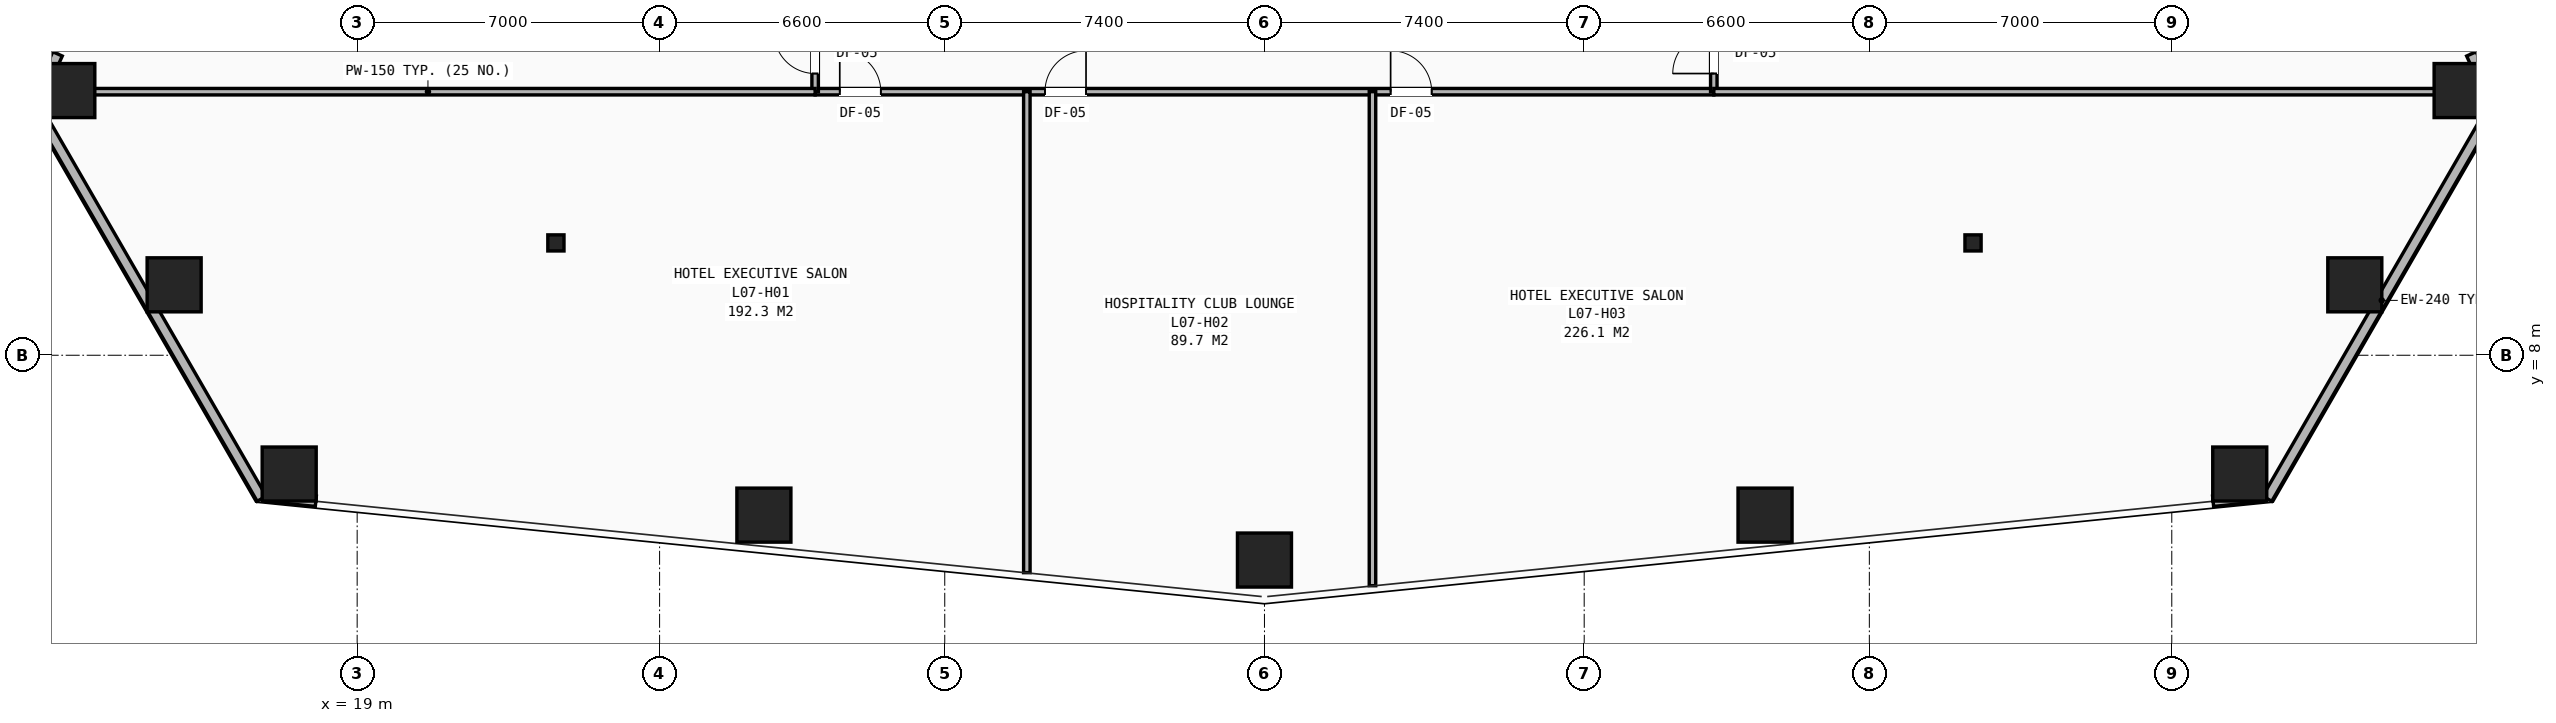
"""IFC4 building model, lengths in metres.
Left out: names, types, materials, properties, quantities, classifications, styles, units other than length and angle.
Written with IfcOpenShell. Run it as: python <this file> out.ifc"""

import sys

from ifc_helpers import new_model, si_unit, direction, frame, frame_2d, origin, origin_2d, place, context, subcontext, project, spatial, rectangle, hollow_rectangle, i_section, extrude, element, fill, save


model = new_model("IFC4")
c1 = context("Model", 3, precision=1e-05, world=origin(), true_north=direction((0.0, 1.0)))
c2 = subcontext(c1, "Body", "Model", "MODEL_VIEW")
j1 = project(units=[si_unit("LENGTHUNIT", "METRE"), si_unit("PLANEANGLEUNIT", "RADIAN")], contexts=[c1])
p1 = place(None, origin())
s1 = spatial("IfcSite", under=j1, at=p1, CompositionType="ELEMENT")
p2 = place(p1, origin())
s2 = spatial("IfcBuilding", under=s1, at=p2, CompositionType="ELEMENT")
p3 = place(p2, frame((0.0, 0.0, 30.4)))
s3 = spatial("IfcBuildingStorey", under=s2, at=p3, CompositionType="ELEMENT", Elevation=30.4)
for number, where, z_axis, x_axis in (
    (1, (23.6, 10.6, 0.0), (0.0, 0.0, 1.0), (1.0, 0.0, 0.0)),
    (2, (56.4, 10.6, 0.0), (0.0, 0.0, 1.0), (1.0, 0.0, 0.0)),
):
    element("IfcColumn", number, at=place(p3, frame(where, z_axis=z_axis, x_axis=x_axis)), inside=s3, PredefinedType="COLUMN", context=c2, shape_type="SweptSolid", body=[
        extrude(i_section(OverallWidth=0.374, OverallDepth=0.372, WebThickness=0.016, FlangeThickness=0.026, at=origin_2d()), origin(), (0.0, 0.0, 1.0), 3.2),
    ])
for number, where, z_axis, x_axis in (
    (3, (12.303, 14.126, 0.0), (0.0, 0.0, 1.0), (1.0, 0.0, 0.0)),
    (4, (14.764, 9.63, 0.0), (0.0, 0.0, 1.0), (1.0, 0.0, 0.0)),
    (5, (17.427, 5.251, 0.0), (0.0, 0.0, 1.0), (1.0, 0.0, 0.0)),
    (6, (28.414, 4.3, 0.0), (0.0, 0.0, 1.0), (1.0, 0.0, 0.0)),
    (7, (40.0, 3.26, 0.0), (0.0, 0.0, 1.0), (1.0, 0.0, 0.0)),
    (8, (51.586, 4.3, 0.0), (0.0, 0.0, 1.0), (1.0, 0.0, 0.0)),
    (9, (62.573, 5.251, 0.0), (0.0, 0.0, 1.0), (1.0, 0.0, 0.0)),
    (10, (65.236, 9.63, 0.0), (0.0, 0.0, 1.0), (1.0, 0.0, 0.0)),
    (11, (67.697, 14.126, 0.0), (0.0, 0.0, 1.0), (1.0, 0.0, 0.0)),
):
    element("IfcColumn", number, at=place(p3, frame(where, z_axis=z_axis, x_axis=x_axis)), inside=s3, PredefinedType="COLUMN", context=c2, shape_type="SweptSolid", body=[
        extrude(hollow_rectangle(XDim=1.25, YDim=1.25, WallThickness=0.08, at=origin_2d()), origin(), (0.0, 0.0, 1.0), 3.2),
    ])
p4 = place(p3, frame((12.065, 14.975, 0.0), z_axis=(0.0, 0.0, 1.0), x_axis=(-0.410810004845, -0.91172097701, 0.0)))
e12 = element("IfcWall", 12, at=p4, inside=s3, PredefinedType="SHEAR", context=c2, shape_type="SweptSolid", body=[
    extrude(rectangle(XDim=1.162, YDim=0.24, at=frame_2d((0.581, 0.0))), origin(), (0.0, 0.0, 1.0), 2.263),
])
p5 = place(p3, frame((16.79, 4.68, 0.0), z_axis=(0.0, 0.0, 1.0), x_axis=(-0.49998363312, 0.866034853001, 0.0)))
e13 = element("IfcWall", 13, at=p5, inside=s3, PredefinedType="SHEAR", context=c2, shape_type="SweptSolid", body=[
    extrude(rectangle(XDim=10.6, YDim=0.24, at=frame_2d((5.3, 0.0))), origin(), (0.0, 0.0, 1.0), 2.263),
])
for number, where, z_axis, x_axis in (
    (14, (16.887, 4.737, 0.0), (0.0, 0.0, 1.0), (0.995, -0.1, 0.0)),
    (15, (61.957, 4.621, 0.0), (0.0, 0.0, 1.0), (0.995, 0.1, 0.0)),
):
    element("IfcWall", number, at=place(p3, frame(where, z_axis=z_axis, x_axis=x_axis)), inside=s3, PredefinedType="SHEAR", context=c2, shape_type="SweptSolid", body=[
        extrude(rectangle(XDim=1.163, YDim=0.24, at=frame_2d((0.581, 0.0))), origin(), (0.0, 0.0, 1.0), 2.263),
    ])
p6 = place(p3, frame((68.51, 13.86, 0.0), z_axis=(0.0, 0.0, 1.0), x_axis=(-0.49998363312, -0.866034853001, 0.0)))
e16 = element("IfcWall", 16, at=p6, inside=s3, PredefinedType="SHEAR", context=c2, shape_type="SweptSolid", body=[
    extrude(rectangle(XDim=10.6, YDim=0.24, at=frame_2d((5.3, 0.0))), origin(), (0.0, 0.0, 1.0), 2.263),
])
p7 = place(p3, frame((68.412, 13.915, 0.0), z_axis=(0.0, 0.0, 1.0), x_axis=(-0.410810004845, 0.91172097701, 0.0)))
e17 = element("IfcWall", 17, at=p7, inside=s3, PredefinedType="SHEAR", context=c2, shape_type="SweptSolid", body=[
    extrude(rectangle(XDim=1.162, YDim=0.24, at=frame_2d((0.581, 0.0))), origin(), (0.0, 0.0, 1.0), 2.263),
])
p8 = place(p3, frame((29.6, 14.1, 0.0), z_axis=(0.0, 0.0, 1.0), x_axis=(1.0, 0.0, 0.0)))
e18 = element("IfcWall", 18, at=p8, inside=s3, PredefinedType="PARTITIONING", context=c2, shape_type="SweptSolid", body=[
    extrude(rectangle(XDim=20.8, YDim=0.15, at=frame_2d((10.4, 0.0))), origin(), (0.0, 0.0, 1.0), 2.431),
])
p9 = place(p8, frame((0.57, 0.0, 0.0)))
e19 = element("IfcOpeningElement", 19, at=p9, cuts=e18, PredefinedType="OPENING", context=c2, shape_type="SweptSolid", body=[
    extrude(rectangle(XDim=0.95, YDim=2.1, at=frame_2d((0.475, 1.05))), frame((0.0, 0.085, 0.0), z_axis=(0.0, -1.0, 0.0), x_axis=(1.0, 0.0, 0.0)), (0.0, 0.0, 1.0), 0.17),
])
p10 = place(p8, frame((5.32, 0.0, 0.0)))
e20 = element("IfcOpeningElement", 20, at=p10, cuts=e18, PredefinedType="OPENING", context=c2, shape_type="SweptSolid", body=[
    extrude(rectangle(XDim=0.95, YDim=2.1, at=frame_2d((0.475, 1.05))), frame((0.0, 0.085, 0.0), z_axis=(0.0, -1.0, 0.0), x_axis=(1.0, 0.0, 0.0)), (0.0, 0.0, 1.0), 0.17),
])
p11 = place(p8, frame((13.32, 0.0, 0.0)))
e21 = element("IfcOpeningElement", 21, at=p11, cuts=e18, PredefinedType="OPENING", context=c2, shape_type="SweptSolid", body=[
    extrude(rectangle(XDim=0.95, YDim=2.1, at=frame_2d((0.475, 1.05))), frame((0.0, 0.085, 0.0), z_axis=(0.0, -1.0, 0.0), x_axis=(1.0, 0.0, 0.0)), (0.0, 0.0, 1.0), 0.17),
])
p12 = place(p3, frame((29.6, 14.1, 0.0), z_axis=(0.0, 0.0, 1.0), x_axis=(0.0, 1.0, 0.0)))
e22 = element("IfcWall", 22, at=p12, inside=s3, PredefinedType="PARTITIONING", context=c2, shape_type="SweptSolid", body=[
    extrude(rectangle(XDim=21.9, YDim=0.15, at=frame_2d((10.95, 0.0))), origin(), (0.0, 0.0, 1.0), 2.431),
])
p13 = place(p12, frame((0.42, 0.0, 0.0)))
e23 = element("IfcOpeningElement", 23, at=p13, cuts=e22, PredefinedType="OPENING", context=c2, shape_type="SweptSolid", body=[
    extrude(rectangle(XDim=0.95, YDim=2.1, at=frame_2d((0.475, 1.05))), frame((0.0, 0.085, 0.0), z_axis=(0.0, -1.0, 0.0), x_axis=(1.0, 0.0, 0.0)), (0.0, 0.0, 1.0), 0.17),
])
p14 = place(p12, frame((6.82, 0.0, 0.0)))
e24 = element("IfcOpeningElement", 24, at=p14, cuts=e22, PredefinedType="OPENING", context=c2, shape_type="SweptSolid", body=[
    extrude(rectangle(XDim=0.95, YDim=2.1, at=frame_2d((0.475, 1.05))), frame((0.0, 0.085, 0.0), z_axis=(0.0, -1.0, 0.0), x_axis=(1.0, 0.0, 0.0)), (0.0, 0.0, 1.0), 0.17),
])
p15 = place(p12, frame((14.32, 0.0, 0.0)))
e25 = element("IfcOpeningElement", 25, at=p15, cuts=e22, PredefinedType="OPENING", context=c2, shape_type="SweptSolid", body=[
    extrude(rectangle(XDim=0.95, YDim=2.1, at=frame_2d((0.475, 1.05))), frame((0.0, 0.085, 0.0), z_axis=(0.0, -1.0, 0.0), x_axis=(1.0, 0.0, 0.0)), (0.0, 0.0, 1.0), 0.17),
])
p16 = place(p3, frame((50.4, 14.1, 0.0), z_axis=(0.0, 0.0, 1.0), x_axis=(0.0, 1.0, 0.0)))
e26 = element("IfcWall", 26, at=p16, inside=s3, PredefinedType="PARTITIONING", context=c2, shape_type="SweptSolid", body=[
    extrude(rectangle(XDim=21.9, YDim=0.15, at=frame_2d((10.95, 0.0))), origin(), (0.0, 0.0, 1.0), 2.431),
])
p17 = place(p16, frame((0.42, 0.0, 0.0)))
e27 = element("IfcOpeningElement", 27, at=p17, cuts=e26, PredefinedType="OPENING", context=c2, shape_type="SweptSolid", body=[
    extrude(rectangle(XDim=0.95, YDim=2.1, at=frame_2d((0.475, 1.05))), frame((0.0, 0.085, 0.0), z_axis=(0.0, -1.0, 0.0), x_axis=(1.0, 0.0, 0.0)), (0.0, 0.0, 1.0), 0.17),
])
p18 = place(p16, frame((7.82, 0.0, 0.0)))
e28 = element("IfcOpeningElement", 28, at=p18, cuts=e26, PredefinedType="OPENING", context=c2, shape_type="SweptSolid", body=[
    extrude(rectangle(XDim=0.95, YDim=2.1, at=frame_2d((0.475, 1.05))), frame((0.0, 0.085, 0.0), z_axis=(0.0, -1.0, 0.0), x_axis=(1.0, 0.0, 0.0)), (0.0, 0.0, 1.0), 0.17),
])
p19 = place(p16, frame((15.32, 0.0, 0.0)))
e29 = element("IfcOpeningElement", 29, at=p19, cuts=e26, PredefinedType="OPENING", context=c2, shape_type="SweptSolid", body=[
    extrude(rectangle(XDim=0.95, YDim=2.1, at=frame_2d((0.475, 1.05))), frame((0.0, 0.085, 0.0), z_axis=(0.0, -1.0, 0.0), x_axis=(1.0, 0.0, 0.0)), (0.0, 0.0, 1.0), 0.17),
])
p20 = place(p3, frame((34.5, 2.968, 0.0), z_axis=(0.0, 0.0, 1.0), x_axis=(0.0, 1.0, 0.0)))
e30 = element("IfcWall", 30, at=p20, inside=s3, PredefinedType="PARTITIONING", context=c2, shape_type="SweptSolid", body=[
    extrude(rectangle(XDim=11.132, YDim=0.15, at=frame_2d((5.566, 0.0))), origin(), (0.0, 0.0, 1.0), 2.268),
])
p21 = place(p3, frame((42.5, 2.666, 0.0), z_axis=(0.0, 0.0, 1.0), x_axis=(0.0, 1.0, 0.0)))
e31 = element("IfcWall", 31, at=p21, inside=s3, PredefinedType="PARTITIONING", context=c2, shape_type="SweptSolid", body=[
    extrude(rectangle(XDim=11.434, YDim=0.15, at=frame_2d((5.717, 0.0))), origin(), (0.0, 0.0, 1.0), 2.268),
])
for number, where, z_axis, x_axis in (
    (32, (11.677, 14.1, 0.0), (0.0, 0.0, 1.0), (1.0, 0.0, 0.0)),
    (33, (50.4, 14.1, 0.0), (0.0, 0.0, 1.0), (1.0, 0.0, 0.0)),
):
    element("IfcWall", number, at=place(p3, frame(where, z_axis=z_axis, x_axis=x_axis)), inside=s3, PredefinedType="PARTITIONING", context=c2, shape_type="SweptSolid", body=[
        extrude(rectangle(XDim=17.923, YDim=0.15, at=frame_2d((8.961, 0.0))), origin(), (0.0, 0.0, 1.0), 2.268),
    ])
p22 = place(p9, origin())
e34 = element("IfcDoor", 34, at=p22, inside=s3, OperationType="SINGLE_SWING_LEFT", PredefinedType="DOOR", context=c2, shape_type="SweptSolid", body=[
    extrude(rectangle(XDim=0.95, YDim=2.1, at=frame_2d((0.475, 1.05))), frame((0.0, 0.025, 0.0), z_axis=(0.0, -1.0, 0.0), x_axis=(1.0, 0.0, 0.0)), (0.0, 0.0, 1.0), 0.05),
])
fill(e19, e34)
p23 = place(p10, origin())
e35 = element("IfcDoor", 35, at=p23, inside=s3, OperationType="SINGLE_SWING_RIGHT", PredefinedType="DOOR", context=c2, shape_type="SweptSolid", body=[
    extrude(rectangle(XDim=0.95, YDim=2.1, at=frame_2d((0.475, 1.05))), frame((0.0, 0.025, 0.0), z_axis=(0.0, -1.0, 0.0), x_axis=(1.0, 0.0, 0.0)), (0.0, 0.0, 1.0), 0.05),
])
fill(e20, e35)
p24 = place(p11, origin())
e36 = element("IfcDoor", 36, at=p24, inside=s3, OperationType="SINGLE_SWING_LEFT", PredefinedType="DOOR", context=c2, shape_type="SweptSolid", body=[
    extrude(rectangle(XDim=0.95, YDim=2.1, at=frame_2d((0.475, 1.05))), frame((0.0, 0.025, 0.0), z_axis=(0.0, -1.0, 0.0), x_axis=(1.0, 0.0, 0.0)), (0.0, 0.0, 1.0), 0.05),
])
fill(e21, e36)
p25 = place(p13, origin())
e37 = element("IfcDoor", 37, at=p25, inside=s3, OperationType="SINGLE_SWING_RIGHT", PredefinedType="DOOR", context=c2, shape_type="SweptSolid", body=[
    extrude(rectangle(XDim=0.95, YDim=2.1, at=frame_2d((0.475, 1.05))), frame((0.0, 0.025, 0.0), z_axis=(0.0, -1.0, 0.0), x_axis=(1.0, 0.0, 0.0)), (0.0, 0.0, 1.0), 0.05),
])
fill(e23, e37)
p26 = place(p17, origin())
e38 = element("IfcDoor", 38, at=p26, inside=s3, OperationType="SINGLE_SWING_LEFT", PredefinedType="DOOR", context=c2, shape_type="SweptSolid", body=[
    extrude(rectangle(XDim=0.95, YDim=2.1, at=frame_2d((0.475, 1.05))), frame((0.0, 0.025, 0.0), z_axis=(0.0, -1.0, 0.0), x_axis=(1.0, 0.0, 0.0)), (0.0, 0.0, 1.0), 0.05),
])
fill(e27, e38)
save(model, sys.argv[1])
